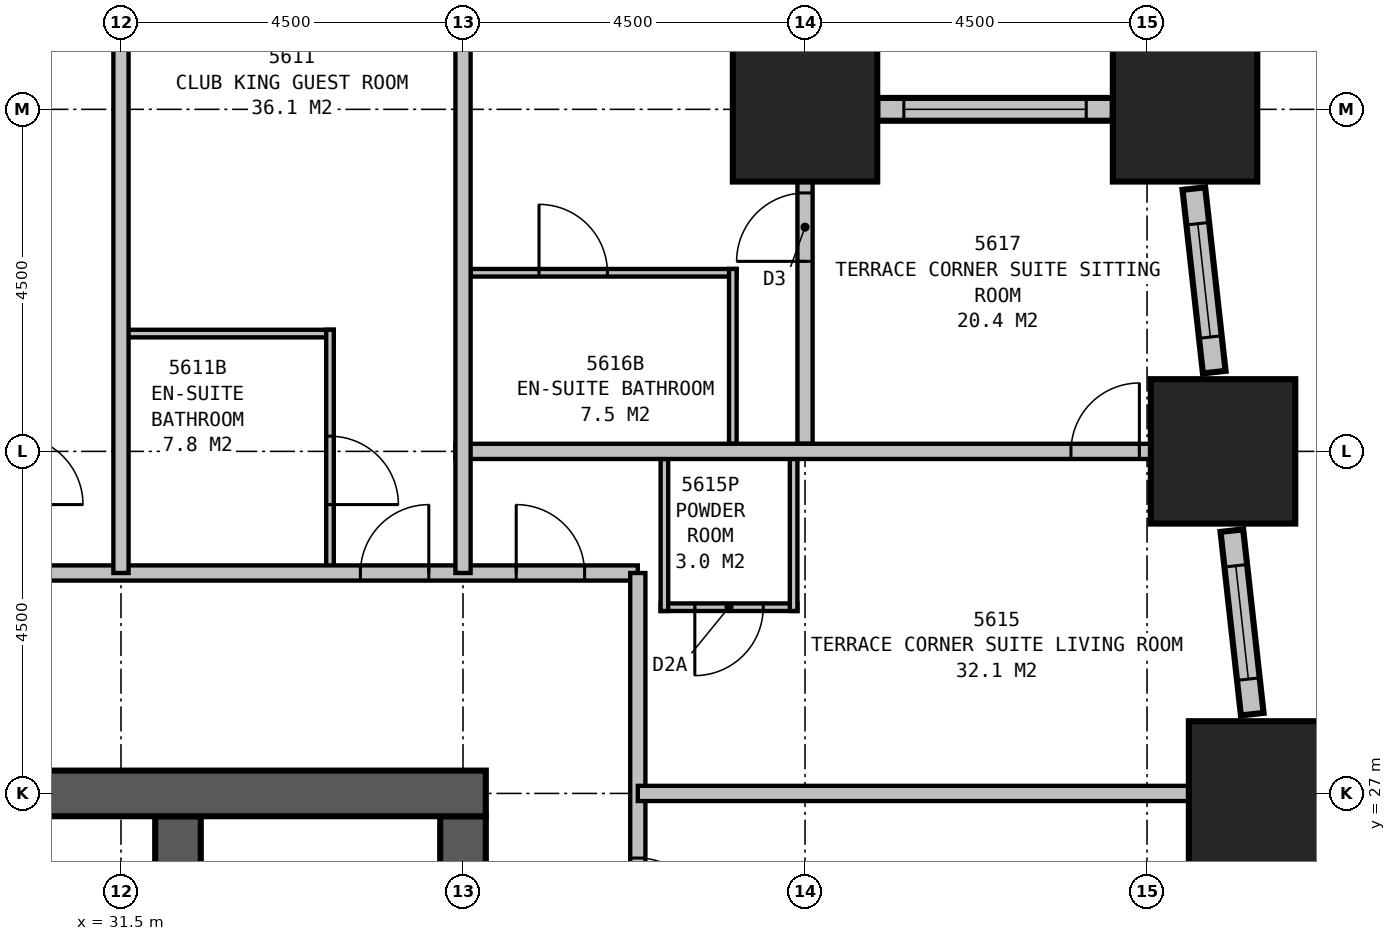
"""IFC4 building model, lengths in metres.
Left out: names, types, materials, properties, quantities, classifications, styles, units other than length and angle.
Written with IfcOpenShell. Run it as: python <this file> out.ifc"""

import sys

from ifc_helpers import new_model, si_unit, direction, frame, frame_2d, origin, origin_2d, place, context, subcontext, project, spatial, rectangle, extrude, element, fill, save


model = new_model("IFC4")
c1 = context("Model", 3, precision=1e-05, world=origin(), true_north=direction((0.0, 1.0)))
c2 = subcontext(c1, "Body", "Model", "MODEL_VIEW")
j1 = project(units=[si_unit("LENGTHUNIT", "METRE"), si_unit("PLANEANGLEUNIT", "RADIAN")], contexts=[c1])
p1 = place(None, origin())
s1 = spatial("IfcSite", under=j1, at=p1, CompositionType="ELEMENT")
p2 = place(p1, origin())
s2 = spatial("IfcBuilding", under=s1, at=p2, CompositionType="ELEMENT")
p3 = place(p2, frame((0.0, 0.0, 217.4)))
s3 = spatial("IfcBuildingStorey", under=s2, at=p3, CompositionType="ELEMENT", Elevation=217.4)
for number, where, z_axis, x_axis in (
    (1, (46.5, 27.0, 0.0), (0.0, 0.0, 1.0), (1.0, 0.0, 0.0)),
    (2, (46.0, 31.5, 0.0), (0.0, 0.0, 1.0), (1.0, 0.0, 0.0)),
    (3, (45.5, 36.0, 0.0), (0.0, 0.0, 1.0), (1.0, 0.0, 0.0)),
    (4, (40.5, 36.0, 0.0), (0.0, 0.0, 1.0), (1.0, 0.0, 0.0)),
):
    element("IfcColumn", number, at=place(p3, frame(where, z_axis=z_axis, x_axis=x_axis)), inside=s3, PredefinedType="COLUMN", context=c2, shape_type="SweptSolid", body=[
        extrude(rectangle(XDim=1.9, YDim=1.9, at=origin_2d()), origin(), (0.0, 0.0, 1.0), 3.9),
    ])
p4 = place(p3, frame((36.3, 27.0, 0.0), z_axis=(0.0, 0.0, 1.0), x_axis=(-1.0, 0.0, 0.0)))
e5 = element("IfcWall", 5, at=p4, inside=s3, PredefinedType="SHEAR", context=c2, shape_type="SweptSolid", body=[
    extrude(rectangle(XDim=23.35, YDim=0.6, at=frame_2d((11.675, 0.0))), origin(), (0.0, 0.0, 1.0), 3.9),
])
p5 = place(p4, frame((17.05, 0.0, 0.0)))
e6 = element("IfcOpeningElement", 6, at=p5, cuts=e5, PredefinedType="OPENING", context=c2, shape_type="SweptSolid", body=[
    extrude(rectangle(XDim=1.0, YDim=2.1, at=frame_2d((0.5, 1.05))), frame((0.0, 0.31, 0.0), z_axis=(0.0, -1.0, 0.0), x_axis=(1.0, 0.0, 0.0)), (0.0, 0.0, 1.0), 0.62),
])
p6 = place(p4, frame((12.05, 0.0, 0.0)))
e7 = element("IfcOpeningElement", 7, at=p6, cuts=e5, PredefinedType="OPENING", context=c2, shape_type="SweptSolid", body=[
    extrude(rectangle(XDim=1.0, YDim=2.1, at=frame_2d((0.5, 1.05))), frame((0.0, 0.31, 0.0), z_axis=(0.0, -1.0, 0.0), x_axis=(1.0, 0.0, 0.0)), (0.0, 0.0, 1.0), 0.62),
])
p7 = place(p4, frame((7.05, 0.0, 0.0)))
e8 = element("IfcOpeningElement", 8, at=p7, cuts=e5, PredefinedType="OPENING", context=c2, shape_type="SweptSolid", body=[
    extrude(rectangle(XDim=1.0, YDim=2.1, at=frame_2d((0.5, 1.05))), frame((0.0, 0.31, 0.0), z_axis=(0.0, -1.0, 0.0), x_axis=(1.0, 0.0, 0.0)), (0.0, 0.0, 1.0), 0.62),
])
p8 = place(p3, frame((32.25, 13.8, 0.0), z_axis=(0.0, 0.0, 1.0), x_axis=(0.0, 1.0, 0.0)))
e9 = element("IfcWall", 9, at=p8, inside=s3, PredefinedType="SHEAR", context=c2, shape_type="SweptSolid", body=[
    extrude(rectangle(XDim=12.9, YDim=0.6, at=frame_2d((6.45, 0.0))), origin(), (0.0, 0.0, 1.0), 3.9),
])
p9 = place(p8, frame((5.05, 0.0, 0.0), z_axis=(0.0, 0.0, 1.0), x_axis=(-1.0, 0.0, 0.0)))
e10 = element("IfcOpeningElement", 10, at=p9, cuts=e9, PredefinedType="OPENING", context=c2, shape_type="SweptSolid", body=[
    extrude(rectangle(XDim=1.2, YDim=2.1, at=frame_2d((0.6, 1.05))), frame((0.0, 0.31, 0.0), z_axis=(0.0, -1.0, 0.0), x_axis=(1.0, 0.0, 0.0)), (0.0, 0.0, 1.0), 0.62),
])
p10 = place(p3, frame((36.0, 20.0, 0.0), z_axis=(0.0, 0.0, 1.0), x_axis=(0.0, 1.0, 0.0)))
e11 = element("IfcWall", 11, at=p10, inside=s3, PredefinedType="SHEAR", context=c2, shape_type="SweptSolid", body=[
    extrude(rectangle(XDim=6.7, YDim=0.6, at=frame_2d((3.35, 0.0))), origin(), (0.0, 0.0, 1.0), 3.9),
])
p11 = place(p3, frame((46.384, 28.043, 0.0), z_axis=(0.0, 0.0, 1.0), x_axis=(-0.110343286306, 0.993893535127, 0.0)))
e12 = element("IfcWall", 12, at=p11, inside=s3, PredefinedType="STANDARD", context=c2, shape_type="SweptSolid", body=[
    extrude(rectangle(XDim=2.429, YDim=0.3, at=frame_2d((1.215, 0.0))), origin(), (0.0, 0.0, 1.0), 2.15),
])
p12 = place(p11, frame((0.464, 0.0, 0.5)))
e13 = element("IfcOpeningElement", 13, at=p12, cuts=e12, PredefinedType="OPENING", context=c2, shape_type="SweptSolid", body=[
    extrude(rectangle(XDim=1.5, YDim=1.5, at=frame_2d((0.75, 0.75))), frame((0.0, 0.16, 0.0), z_axis=(0.0, -1.0, 0.0), x_axis=(1.0, 0.0, 0.0)), (0.0, 0.0, 1.0), 0.32),
])
p13 = place(p3, frame((45.884, 32.543, 0.0), z_axis=(0.0, 0.0, 1.0), x_axis=(-0.110343286306, 0.993893535127, 0.0)))
e14 = element("IfcWall", 14, at=p13, inside=s3, PredefinedType="STANDARD", context=c2, shape_type="SweptSolid", body=[
    extrude(rectangle(XDim=2.429, YDim=0.3, at=frame_2d((1.215, 0.0))), origin(), (0.0, 0.0, 1.0), 2.15),
])
p14 = place(p13, frame((0.465, 0.0, 0.5)))
e15 = element("IfcOpeningElement", 15, at=p14, cuts=e14, PredefinedType="OPENING", context=c2, shape_type="SweptSolid", body=[
    extrude(rectangle(XDim=1.5, YDim=1.5, at=frame_2d((0.75, 0.75))), frame((0.0, 0.16, 0.0), z_axis=(0.0, -1.0, 0.0), x_axis=(1.0, 0.0, 0.0)), (0.0, 0.0, 1.0), 0.32),
])
p15 = place(p3, frame((44.55, 36.0, 0.0), z_axis=(0.0, 0.0, 1.0), x_axis=(-1.0, 0.0, 0.0)))
e16 = element("IfcWall", 16, at=p15, inside=s3, PredefinedType="STANDARD", context=c2, shape_type="SweptSolid", body=[
    extrude(rectangle(XDim=3.1, YDim=0.3, at=frame_2d((1.55, 0.0))), origin(), (0.0, 0.0, 1.0), 2.15),
])
p16 = place(p15, frame((0.35, 0.0, 0.5)))
e17 = element("IfcOpeningElement", 17, at=p16, cuts=e16, PredefinedType="OPENING", context=c2, shape_type="SweptSolid", body=[
    extrude(rectangle(XDim=2.4, YDim=1.5, at=frame_2d((1.2, 0.75))), frame((0.0, 0.16, 0.0), z_axis=(0.0, -1.0, 0.0), x_axis=(1.0, 0.0, 0.0)), (0.0, 0.0, 1.0), 0.32),
])
p17 = place(p3, frame((12.473, 29.9, 0.0), z_axis=(0.0, 0.0, 1.0), x_axis=(1.0, 0.0, 0.0)))
e18 = element("IfcWall", 18, at=p17, inside=s3, PredefinedType="PARTITIONING", context=c2, shape_type="SweptSolid", body=[
    extrude(rectangle(XDim=25.827, YDim=0.2, at=frame_2d((12.914, 0.0))), origin(), (0.0, 0.0, 1.0), 3.65),
])
p18 = place(p17, frame((1.25, 0.0, 0.0)))
e19 = element("IfcOpeningElement", 19, at=p18, cuts=e18, PredefinedType="OPENING", context=c2, shape_type="SweptSolid", body=[
    extrude(rectangle(XDim=0.9, YDim=2.1, at=frame_2d((0.45, 1.05))), frame((0.0, 0.11, 0.0), z_axis=(0.0, -1.0, 0.0), x_axis=(1.0, 0.0, 0.0)), (0.0, 0.0, 1.0), 0.22),
])
p19 = place(p17, frame((8.677, 0.0, 0.0)))
e20 = element("IfcOpeningElement", 20, at=p19, cuts=e18, PredefinedType="OPENING", context=c2, shape_type="SweptSolid", body=[
    extrude(rectangle(XDim=0.9, YDim=2.1, at=frame_2d((0.45, 1.05))), frame((0.0, 0.11, 0.0), z_axis=(0.0, -1.0, 0.0), x_axis=(1.0, 0.0, 0.0)), (0.0, 0.0, 1.0), 0.22),
])
p20 = place(p17, frame((12.777, 0.0, 0.0)))
e21 = element("IfcOpeningElement", 21, at=p20, cuts=e18, PredefinedType="OPENING", context=c2, shape_type="SweptSolid", body=[
    extrude(rectangle(XDim=0.9, YDim=2.1, at=frame_2d((0.45, 1.05))), frame((0.0, 0.11, 0.0), z_axis=(0.0, -1.0, 0.0), x_axis=(1.0, 0.0, 0.0)), (0.0, 0.0, 1.0), 0.22),
])
p21 = place(p17, frame((22.177, 0.0, 0.0)))
e22 = element("IfcOpeningElement", 22, at=p21, cuts=e18, PredefinedType="OPENING", context=c2, shape_type="SweptSolid", body=[
    extrude(rectangle(XDim=0.9, YDim=2.1, at=frame_2d((0.45, 1.05))), frame((0.0, 0.11, 0.0), z_axis=(0.0, -1.0, 0.0), x_axis=(1.0, 0.0, 0.0)), (0.0, 0.0, 1.0), 0.22),
])
p22 = place(p17, frame((24.227, 0.0, 0.0)))
e23 = element("IfcOpeningElement", 23, at=p22, cuts=e18, PredefinedType="OPENING", context=c2, shape_type="SweptSolid", body=[
    extrude(rectangle(XDim=0.9, YDim=2.1, at=frame_2d((0.45, 1.05))), frame((0.0, 0.11, 0.0), z_axis=(0.0, -1.0, 0.0), x_axis=(1.0, 0.0, 0.0)), (0.0, 0.0, 1.0), 0.22),
])
p23 = place(p3, frame((38.3, 11.2, 0.0), z_axis=(0.0, 0.0, 1.0), x_axis=(0.0, 1.0, 0.0)))
e24 = element("IfcWall", 24, at=p23, inside=s3, PredefinedType="PARTITIONING", context=c2, shape_type="SweptSolid", body=[
    extrude(rectangle(XDim=18.7, YDim=0.2, at=frame_2d((9.35, 0.0))), origin(), (0.0, 0.0, 1.0), 3.65),
])
p24 = place(p23, frame((6.35, 0.0, 0.0), z_axis=(0.0, 0.0, 1.0), x_axis=(-1.0, 0.0, 0.0)))
e25 = element("IfcOpeningElement", 25, at=p24, cuts=e24, PredefinedType="OPENING", context=c2, shape_type="SweptSolid", body=[
    extrude(rectangle(XDim=0.9, YDim=2.1, at=frame_2d((0.45, 1.05))), frame((0.0, 0.11, 0.0), z_axis=(0.0, -1.0, 0.0), x_axis=(1.0, 0.0, 0.0)), (0.0, 0.0, 1.0), 0.22),
])
p25 = place(p23, frame((14.95, 0.0, 0.0), z_axis=(0.0, 0.0, 1.0), x_axis=(-1.0, 0.0, 0.0)))
e26 = element("IfcOpeningElement", 26, at=p25, cuts=e24, PredefinedType="OPENING", context=c2, shape_type="SweptSolid", body=[
    extrude(rectangle(XDim=0.9, YDim=2.1, at=frame_2d((0.45, 1.05))), frame((0.0, 0.11, 0.0), z_axis=(0.0, -1.0, 0.0), x_axis=(1.0, 0.0, 0.0)), (0.0, 0.0, 1.0), 0.22),
])
p26 = place(p3, frame((31.5, 29.9, 0.0), z_axis=(0.0, 0.0, 1.0), x_axis=(0.0, 1.0, 0.0)))
e27 = element("IfcWall", 27, at=p26, inside=s3, PredefinedType="PARTITIONING", context=c2, shape_type="SweptSolid", body=[
    extrude(rectangle(XDim=10.6, YDim=0.2, at=frame_2d((5.3, 0.0))), origin(), (0.0, 0.0, 1.0), 2.65),
])
p27 = place(p3, frame((31.5, 33.05, 0.0), z_axis=(0.0, 0.0, 1.0), x_axis=(1.0, 0.0, 0.0)))
e28 = element("IfcWall", 28, at=p27, inside=s3, PredefinedType="PLUMBINGWALL", context=c2, shape_type="SweptSolid", body=[
    extrude(rectangle(XDim=2.8, YDim=0.1, at=frame_2d((1.4, 0.0))), origin(), (0.0, 0.0, 1.0), 3.65),
])
p28 = place(p3, frame((34.25, 29.9, 0.0), z_axis=(0.0, 0.0, 1.0), x_axis=(0.0, 1.0, 0.0)))
e29 = element("IfcWall", 29, at=p28, inside=s3, PredefinedType="PLUMBINGWALL", context=c2, shape_type="SweptSolid", body=[
    extrude(rectangle(XDim=3.2, YDim=0.1, at=frame_2d((1.6, 0.0))), origin(), (0.0, 0.0, 1.0), 3.65),
])
p29 = place(p28, frame((1.8, 0.0, 0.0), z_axis=(0.0, 0.0, 1.0), x_axis=(-1.0, 0.0, 0.0)))
e30 = element("IfcOpeningElement", 30, at=p29, cuts=e29, PredefinedType="OPENING", context=c2, shape_type="SweptSolid", body=[
    extrude(rectangle(XDim=0.9, YDim=2.1, at=frame_2d((0.45, 1.05))), frame((0.0, 0.06, 0.0), z_axis=(0.0, -1.0, 0.0), x_axis=(1.0, 0.0, 0.0)), (0.0, 0.0, 1.0), 0.12),
])
p30 = place(p3, frame((38.3, 27.0, 0.0), z_axis=(0.0, 0.0, 1.0), x_axis=(1.0, 0.0, 0.0)))
e31 = element("IfcWall", 31, at=p30, inside=s3, PredefinedType="PARTITIONING", context=c2, shape_type="SweptSolid", body=[
    extrude(rectangle(XDim=7.977, YDim=0.2, at=frame_2d((3.988, 0.0))), origin(), (0.0, 0.0, 1.0), 2.35),
])
p31 = place(p3, frame((36.0, 29.9, 0.0), z_axis=(0.0, 0.0, 1.0), x_axis=(0.0, 1.0, 0.0)))
e32 = element("IfcWall", 32, at=p31, inside=s3, PredefinedType="PARTITIONING", context=c2, shape_type="SweptSolid", body=[
    extrude(rectangle(XDim=10.6, YDim=0.2, at=frame_2d((5.3, 0.0))), origin(), (0.0, 0.0, 1.0), 2.65),
])
p32 = place(p3, frame((35.9, 31.5, 0.0), z_axis=(0.0, 0.0, 1.0), x_axis=(1.0, 0.0, 0.0)))
e33 = element("IfcWall", 33, at=p32, inside=s3, PredefinedType="PARTITIONING", context=c2, shape_type="SweptSolid", body=[
    extrude(rectangle(XDim=10.099, YDim=0.2, at=frame_2d((5.05, 0.0))), origin(), (0.0, 0.0, 1.0), 3.65),
])
p33 = place(p32, frame((8.099, 0.0, 0.0)))
e34 = element("IfcOpeningElement", 34, at=p33, cuts=e33, PredefinedType="OPENING", context=c2, shape_type="SweptSolid", body=[
    extrude(rectangle(XDim=0.9, YDim=2.1, at=frame_2d((0.45, 1.05))), frame((0.0, 0.11, 0.0), z_axis=(0.0, -1.0, 0.0), x_axis=(1.0, 0.0, 0.0)), (0.0, 0.0, 1.0), 0.22),
])
p34 = place(p3, frame((40.35, 31.4, 0.0), z_axis=(0.0, 0.0, 1.0), x_axis=(0.0, -1.0, 0.0)))
e35 = element("IfcWall", 35, at=p34, inside=s3, PredefinedType="PLUMBINGWALL", context=c2, shape_type="SweptSolid", body=[
    extrude(rectangle(XDim=2.0, YDim=0.1, at=frame_2d((1.0, 0.0))), origin(), (0.0, 0.0, 1.0), 2.65),
])
p35 = place(p3, frame((38.65, 31.4, 0.0), z_axis=(0.0, 0.0, 1.0), x_axis=(0.0, -1.0, 0.0)))
e36 = element("IfcWall", 36, at=p35, inside=s3, PredefinedType="PLUMBINGWALL", context=c2, shape_type="SweptSolid", body=[
    extrude(rectangle(XDim=2.0, YDim=0.1, at=frame_2d((1.0, 0.0))), origin(), (0.0, 0.0, 1.0), 3.65),
])
p36 = place(p3, frame((38.6, 29.45, 0.0), z_axis=(0.0, 0.0, 1.0), x_axis=(1.0, 0.0, 0.0)))
e37 = element("IfcWall", 37, at=p36, inside=s3, PredefinedType="PLUMBINGWALL", context=c2, shape_type="SweptSolid", body=[
    extrude(rectangle(XDim=1.8, YDim=0.1, at=frame_2d((0.9, 0.0))), origin(), (0.0, 0.0, 1.0), 3.65),
])
p37 = place(p36, frame((1.35, 0.0, 0.0), z_axis=(0.0, 0.0, 1.0), x_axis=(-1.0, 0.0, 0.0)))
e38 = element("IfcOpeningElement", 38, at=p37, cuts=e37, PredefinedType="OPENING", context=c2, shape_type="SweptSolid", body=[
    extrude(rectangle(XDim=0.9, YDim=2.1, at=frame_2d((0.45, 1.05))), frame((0.0, 0.06, 0.0), z_axis=(0.0, -1.0, 0.0), x_axis=(1.0, 0.0, 0.0)), (0.0, 0.0, 1.0), 0.12),
])
p38 = place(p3, frame((40.5, 31.6, 0.0), z_axis=(0.0, 0.0, 1.0), x_axis=(0.0, 1.0, 0.0)))
e39 = element("IfcWall", 39, at=p38, inside=s3, PredefinedType="PARTITIONING", context=c2, shape_type="SweptSolid", body=[
    extrude(rectangle(XDim=4.4, YDim=0.2, at=frame_2d((2.2, 0.0))), origin(), (0.0, 0.0, 1.0), 2.65),
])
p39 = place(p38, frame((2.4, 0.0, 0.0)))
e40 = element("IfcOpeningElement", 40, at=p39, cuts=e39, PredefinedType="OPENING", context=c2, shape_type="SweptSolid", body=[
    extrude(rectangle(XDim=0.9, YDim=2.1, at=frame_2d((0.45, 1.05))), frame((0.0, 0.11, 0.0), z_axis=(0.0, -1.0, 0.0), x_axis=(1.0, 0.0, 0.0)), (0.0, 0.0, 1.0), 0.22),
])
p40 = place(p3, frame((39.55, 31.6, 0.0), z_axis=(0.0, 0.0, 1.0), x_axis=(0.0, 1.0, 0.0)))
e41 = element("IfcWall", 41, at=p40, inside=s3, PredefinedType="PLUMBINGWALL", context=c2, shape_type="SweptSolid", body=[
    extrude(rectangle(XDim=2.3, YDim=0.1, at=frame_2d((1.15, 0.0))), origin(), (0.0, 0.0, 1.0), 3.65),
])
p41 = place(p3, frame((36.1, 33.85, 0.0), z_axis=(0.0, 0.0, 1.0), x_axis=(1.0, 0.0, 0.0)))
e42 = element("IfcWall", 42, at=p41, inside=s3, PredefinedType="PLUMBINGWALL", context=c2, shape_type="SweptSolid", body=[
    extrude(rectangle(XDim=3.5, YDim=0.1, at=frame_2d((1.75, 0.0))), origin(), (0.0, 0.0, 1.0), 3.65),
])
p42 = place(p41, frame((0.9, 0.0, 0.0)))
e43 = element("IfcOpeningElement", 43, at=p42, cuts=e42, PredefinedType="OPENING", context=c2, shape_type="SweptSolid", body=[
    extrude(rectangle(XDim=0.9, YDim=2.1, at=frame_2d((0.45, 1.05))), frame((0.0, 0.06, 0.0), z_axis=(0.0, -1.0, 0.0), x_axis=(1.0, 0.0, 0.0)), (0.0, 0.0, 1.0), 0.12),
])
p43 = place(p12, origin())
e44 = element("IfcWindow", 44, at=p43, inside=s3, PartitioningType="SINGLE_PANEL", PredefinedType="WINDOW", context=c2, shape_type="SweptSolid", body=[
    extrude(rectangle(XDim=1.5, YDim=1.5, at=frame_2d((0.75, 0.75))), frame((0.0, 0.03, 0.0), z_axis=(0.0, -1.0, 0.0), x_axis=(1.0, 0.0, 0.0)), (0.0, 0.0, 1.0), 0.06),
])
fill(e13, e44)
p44 = place(p14, origin())
e45 = element("IfcWindow", 45, at=p44, inside=s3, PartitioningType="SINGLE_PANEL", PredefinedType="WINDOW", context=c2, shape_type="SweptSolid", body=[
    extrude(rectangle(XDim=1.5, YDim=1.5, at=frame_2d((0.75, 0.75))), frame((0.0, 0.03, 0.0), z_axis=(0.0, -1.0, 0.0), x_axis=(1.0, 0.0, 0.0)), (0.0, 0.0, 1.0), 0.06),
])
fill(e15, e45)
p45 = place(p16, origin())
e46 = element("IfcWindow", 46, at=p45, inside=s3, PartitioningType="SINGLE_PANEL", PredefinedType="WINDOW", context=c2, shape_type="SweptSolid", body=[
    extrude(rectangle(XDim=2.4, YDim=1.5, at=frame_2d((1.2, 0.75))), frame((0.0, 0.03, 0.0), z_axis=(0.0, -1.0, 0.0), x_axis=(1.0, 0.0, 0.0)), (0.0, 0.0, 1.0), 0.06),
])
fill(e17, e46)
p46 = place(p21, origin())
e47 = element("IfcDoor", 47, at=p46, inside=s3, OperationType="SINGLE_SWING_RIGHT", PredefinedType="DOOR", context=c2, shape_type="SweptSolid", body=[
    extrude(rectangle(XDim=0.9, YDim=2.1, at=frame_2d((0.45, 1.05))), frame((0.0, 0.025, 0.0), z_axis=(0.0, -1.0, 0.0), x_axis=(1.0, 0.0, 0.0)), (0.0, 0.0, 1.0), 0.05),
])
fill(e22, e47)
p47 = place(p22, origin())
e48 = element("IfcDoor", 48, at=p47, inside=s3, OperationType="SINGLE_SWING_LEFT", PredefinedType="DOOR", context=c2, shape_type="SweptSolid", body=[
    extrude(rectangle(XDim=0.9, YDim=2.1, at=frame_2d((0.45, 1.05))), frame((0.0, 0.025, 0.0), z_axis=(0.0, -1.0, 0.0), x_axis=(1.0, 0.0, 0.0)), (0.0, 0.0, 1.0), 0.05),
])
fill(e23, e48)
p48 = place(p25, origin())
e49 = element("IfcDoor", 49, at=p48, inside=s3, OperationType="SINGLE_SWING_RIGHT", PredefinedType="DOOR", context=c2, shape_type="SweptSolid", body=[
    extrude(rectangle(XDim=0.9, YDim=2.1, at=frame_2d((0.45, 1.05))), frame((0.0, 0.025, 0.0), z_axis=(0.0, -1.0, 0.0), x_axis=(1.0, 0.0, 0.0)), (0.0, 0.0, 1.0), 0.05),
])
fill(e26, e49)
p49 = place(p29, origin())
e50 = element("IfcDoor", 50, at=p49, inside=s3, OperationType="SINGLE_SWING_RIGHT", PredefinedType="DOOR", context=c2, shape_type="SweptSolid", body=[
    extrude(rectangle(XDim=0.9, YDim=2.1, at=frame_2d((0.45, 1.05))), frame((0.0, 0.025, 0.0), z_axis=(0.0, -1.0, 0.0), x_axis=(1.0, 0.0, 0.0)), (0.0, 0.0, 1.0), 0.05),
])
fill(e30, e50)
p50 = place(p33, origin())
e51 = element("IfcDoor", 51, at=p50, inside=s3, OperationType="SINGLE_SWING_RIGHT", PredefinedType="DOOR", context=c2, shape_type="SweptSolid", body=[
    extrude(rectangle(XDim=0.9, YDim=2.1, at=frame_2d((0.45, 1.05))), frame((0.0, 0.025, 0.0), z_axis=(0.0, -1.0, 0.0), x_axis=(1.0, 0.0, 0.0)), (0.0, 0.0, 1.0), 0.05),
])
fill(e34, e51)
p51 = place(p37, origin())
e52 = element("IfcDoor", 52, at=p51, inside=s3, OperationType="SINGLE_SWING_RIGHT", PredefinedType="DOOR", context=c2, shape_type="SweptSolid", body=[
    extrude(rectangle(XDim=0.9, YDim=2.1, at=frame_2d((0.45, 1.05))), frame((0.0, 0.025, 0.0), z_axis=(0.0, -1.0, 0.0), x_axis=(1.0, 0.0, 0.0)), (0.0, 0.0, 1.0), 0.05),
])
fill(e38, e52)
p52 = place(p39, origin())
e53 = element("IfcDoor", 53, at=p52, inside=s3, OperationType="SINGLE_SWING_LEFT", PredefinedType="DOOR", context=c2, shape_type="SweptSolid", body=[
    extrude(rectangle(XDim=0.9, YDim=2.1, at=frame_2d((0.45, 1.05))), frame((0.0, 0.025, 0.0), z_axis=(0.0, -1.0, 0.0), x_axis=(1.0, 0.0, 0.0)), (0.0, 0.0, 1.0), 0.05),
])
fill(e40, e53)
p53 = place(p42, origin())
e54 = element("IfcDoor", 54, at=p53, inside=s3, OperationType="SINGLE_SWING_LEFT", PredefinedType="DOOR", context=c2, shape_type="SweptSolid", body=[
    extrude(rectangle(XDim=0.9, YDim=2.1, at=frame_2d((0.45, 1.05))), frame((0.0, 0.025, 0.0), z_axis=(0.0, -1.0, 0.0), x_axis=(1.0, 0.0, 0.0)), (0.0, 0.0, 1.0), 0.05),
])
fill(e43, e54)
save(model, sys.argv[1])
